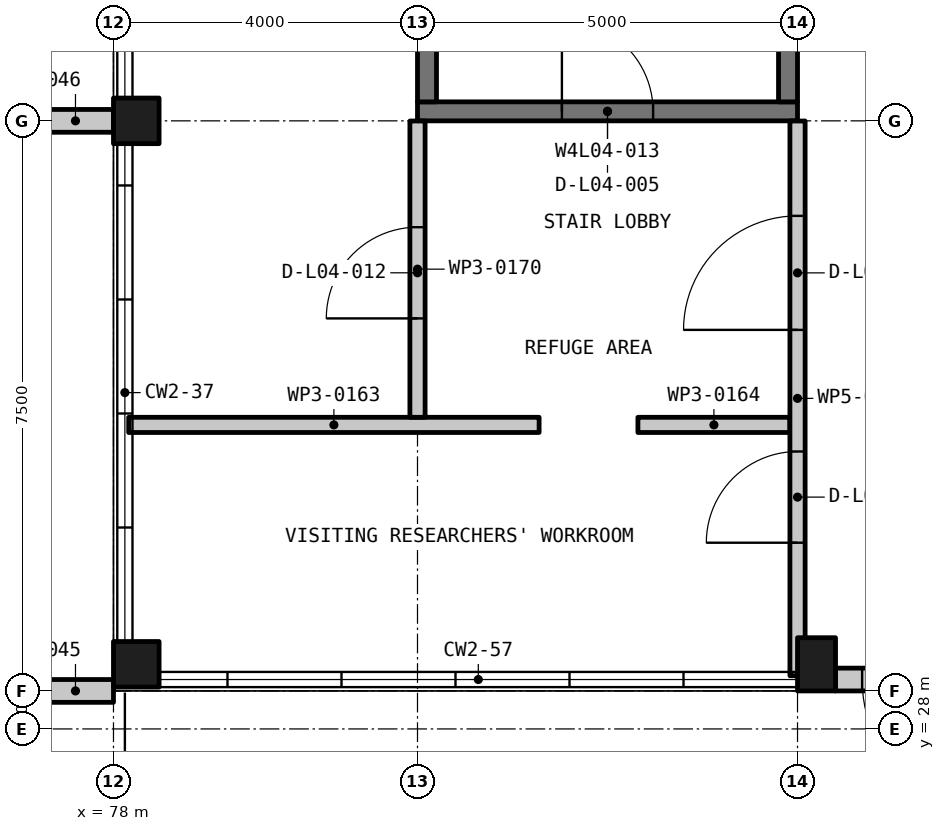
"""IFC4 building model, lengths in metres.
Left out: names, types, materials, properties, quantities, classifications, styles, units other than length and angle.
Written with IfcOpenShell. Run it as: python <this file> out.ifc"""

import sys

from ifc_helpers import new_model, si_unit, direction, frame, frame_2d, origin, origin_2d, place, context, subcontext, project, spatial, rectangle, extrude, element, fill, save


model = new_model("IFC4")
c1 = context("Model", 3, precision=1e-05, world=origin(), true_north=direction((0.0, 1.0)))
c2 = subcontext(c1, "Body", "Model", "MODEL_VIEW")
j1 = project(units=[si_unit("LENGTHUNIT", "METRE"), si_unit("PLANEANGLEUNIT", "RADIAN")], contexts=[c1])
p1 = place(None, origin())
s1 = spatial("IfcSite", under=j1, at=p1, CompositionType="ELEMENT")
p2 = place(p1, origin())
s2 = spatial("IfcBuilding", under=s1, at=p2, CompositionType="ELEMENT")
p3 = place(p2, frame((0.0, 0.0, 20.25)))
s3 = spatial("IfcBuildingStorey", under=s2, at=p3, CompositionType="ELEMENT", Elevation=20.25)
for number, where, z_axis, x_axis in (
    (1, (78.3, 28.85, -0.3), (0.0, 0.0, 1.0), (1.0, 0.0, 0.0)),
    (2, (78.3, 36.0, -0.3), (0.0, 0.0, 1.0), (1.0, 0.0, 0.0)),
):
    element("IfcColumn", number, at=place(p3, frame(where, z_axis=z_axis, x_axis=x_axis)), inside=s3, PredefinedType="COLUMN", context=c2, shape_type="SweptSolid", body=[
        extrude(rectangle(XDim=0.6, YDim=0.6, at=origin_2d()), origin(), (0.0, 0.0, 1.0), 4.5),
    ])
p4 = place(p3, frame((87.25, 28.85, -0.3), z_axis=(0.0, 0.0, 1.0), x_axis=(1.0, 0.0, 0.0)))
e3 = element("IfcColumn", 3, at=p4, inside=s3, PredefinedType="COLUMN", context=c2, shape_type="SweptSolid", body=[
    extrude(rectangle(XDim=0.5, YDim=0.7, at=origin_2d()), origin(), (0.0, 0.0, 1.0), 4.5),
])
p5 = place(p3, frame((82.0, 36.125, -0.3), z_axis=(0.0, 0.0, 1.0), x_axis=(1.0, 0.0, 0.0)))
e4 = element("IfcWall", 4, at=p5, inside=s3, PredefinedType="SHEAR", context=c2, shape_type="SweptSolid", body=[
    extrude(rectangle(XDim=5.0, YDim=0.25, at=frame_2d((2.5, 0.0))), origin(), (0.0, 0.0, 1.0), 4.5),
])
p6 = place(p5, frame((1.9, 0.0, 0.3)))
e5 = element("IfcOpeningElement", 5, at=p6, cuts=e4, PredefinedType="OPENING", context=c2, shape_type="SweptSolid", body=[
    extrude(rectangle(XDim=1.2, YDim=2.2, at=frame_2d((0.6, 1.1))), frame((0.0, 0.135, 0.0), z_axis=(0.0, -1.0, 0.0), x_axis=(1.0, 0.0, 0.0)), (0.0, 0.0, 1.0), 0.27),
])
for number, where, z_axis, x_axis in (
    (6, (86.875, 36.25, -0.3), (0.0, 0.0, 1.0), (0.0, 1.0, 0.0)),
    (7, (82.125, 36.25, -0.3), (0.0, 0.0, 1.0), (0.0, 1.0, 0.0)),
):
    element("IfcWall", number, at=place(p3, frame(where, z_axis=z_axis, x_axis=x_axis)), inside=s3, PredefinedType="SHEAR", context=c2, shape_type="SweptSolid", body=[
        extrude(rectangle(XDim=7.0, YDim=0.25, at=frame_2d((3.5, 0.0))), origin(), (0.0, 0.0, 1.0), 4.5),
    ])
p7 = place(p3, frame((90.21, 28.65, 0.0), z_axis=(0.0, 0.0, 1.0), x_axis=(-1.0, 0.0, 0.0)))
e8 = element("IfcWall", 8, at=p7, inside=s3, PredefinedType="SOLIDWALL", context=c2, shape_type="SweptSolid", body=[
    extrude(rectangle(XDim=2.71, YDim=0.3, at=frame_2d((1.355, 0.0))), origin(), (0.0, 0.0, 1.0), 3.3),
])
p8 = place(p7, frame((0.56, 0.0, 0.0)))
e9 = element("IfcOpeningElement", 9, at=p8, cuts=e8, PredefinedType="OPENING", context=c2, shape_type="SweptSolid", body=[
    extrude(rectangle(XDim=1.8, YDim=2.2, at=frame_2d((0.9, 1.1))), frame((0.0, 0.16, 0.0), z_axis=(0.0, -1.0, 0.0), x_axis=(1.0, 0.0, 0.0)), (0.0, 0.0, 1.0), 0.32),
])
for number, where, z_axis, x_axis in (
    (10, (77.0, 28.5, 0.0), (0.0, 0.0, 1.0), (1.0, 0.0, 0.0)),
    (11, (77.0, 36.0, 0.0), (0.0, 0.0, 1.0), (1.0, 0.0, 0.0)),
):
    element("IfcWall", number, at=place(p3, frame(where, z_axis=z_axis, x_axis=x_axis)), inside=s3, PredefinedType="SOLIDWALL", context=c2, shape_type="SweptSolid", body=[
        extrude(rectangle(XDim=1.0, YDim=0.3, at=frame_2d((0.5, 0.0))), origin(), (0.0, 0.0, 1.0), 4.5),
    ])
p9 = place(p3, frame((78.2, 32.0, 0.0), z_axis=(0.0, 0.0, 1.0), x_axis=(1.0, 0.0, 0.0)))
e12 = element("IfcWall", 12, at=p9, inside=s3, PredefinedType="PARTITIONING", context=c2, shape_type="SweptSolid", body=[
    extrude(rectangle(XDim=5.4, YDim=0.2, at=frame_2d((2.7, 0.0))), origin(), (0.0, 0.0, 1.0), 3.4),
])
p10 = place(p3, frame((84.9, 32.0, 0.0), z_axis=(0.0, 0.0, 1.0), x_axis=(1.0, 0.0, 0.0)))
e13 = element("IfcWall", 13, at=p10, inside=s3, PredefinedType="PARTITIONING", context=c2, shape_type="SweptSolid", body=[
    extrude(rectangle(XDim=2.0, YDim=0.2, at=frame_2d((1.0, 0.0))), origin(), (0.0, 0.0, 1.0), 4.2),
])
p11 = place(p3, frame((87.0, 28.7, 0.0), z_axis=(0.0, 0.0, 1.0), x_axis=(0.0, 1.0, 0.0)))
e14 = element("IfcWall", 14, at=p11, inside=s3, PredefinedType="PARTITIONING", context=c2, shape_type="SweptSolid", body=[
    extrude(rectangle(XDim=7.298, YDim=0.2, at=frame_2d((3.649, 0.0))), origin(), (0.0, 0.0, 1.0), 3.3),
])
p12 = place(p11, frame((4.55, 0.0, 0.0)))
e15 = element("IfcOpeningElement", 15, at=p12, cuts=e14, PredefinedType="OPENING", context=c2, shape_type="SweptSolid", body=[
    extrude(rectangle(XDim=1.5, YDim=2.1, at=frame_2d((0.75, 1.05))), frame((0.0, 0.11, 0.0), z_axis=(0.0, -1.0, 0.0), x_axis=(1.0, 0.0, 0.0)), (0.0, 0.0, 1.0), 0.22),
])
p13 = place(p11, frame((1.75, 0.0, 0.0)))
e16 = element("IfcOpeningElement", 16, at=p13, cuts=e14, PredefinedType="OPENING", context=c2, shape_type="SweptSolid", body=[
    extrude(rectangle(XDim=1.2, YDim=2.1, at=frame_2d((0.6, 1.05))), frame((0.0, 0.11, 0.0), z_axis=(0.0, -1.0, 0.0), x_axis=(1.0, 0.0, 0.0)), (0.0, 0.0, 1.0), 0.22),
])
p14 = place(p3, frame((82.0, 32.1, 0.0), z_axis=(0.0, 0.0, 1.0), x_axis=(0.0, 1.0, 0.0)))
e17 = element("IfcWall", 17, at=p14, inside=s3, PredefinedType="PARTITIONING", context=c2, shape_type="SweptSolid", body=[
    extrude(rectangle(XDim=3.898, YDim=0.2, at=frame_2d((1.949, 0.0))), origin(), (0.0, 0.0, 1.0), 3.4),
])
p15 = place(p14, frame((1.301, 0.0, 0.0)))
e18 = element("IfcOpeningElement", 18, at=p15, cuts=e17, PredefinedType="OPENING", context=c2, shape_type="SweptSolid", body=[
    extrude(rectangle(XDim=1.2, YDim=2.1, at=frame_2d((0.6, 1.05))), frame((0.0, 0.11, 0.0), z_axis=(0.0, -1.0, 0.0), x_axis=(1.0, 0.0, 0.0)), (0.0, 0.0, 1.0), 0.22),
])
p16 = place(p8, origin())
e19 = element("IfcDoor", 19, at=p16, inside=s3, OperationType="SINGLE_SWING_LEFT", PredefinedType="DOOR", context=c2, shape_type="SweptSolid", body=[
    extrude(rectangle(XDim=1.8, YDim=2.2, at=frame_2d((0.9, 1.1))), frame((0.0, 0.025, 0.0), z_axis=(0.0, -1.0, 0.0), x_axis=(1.0, 0.0, 0.0)), (0.0, 0.0, 1.0), 0.05),
])
fill(e9, e19)
p17 = place(p6, origin())
e20 = element("IfcDoor", 20, at=p17, inside=s3, OperationType="SINGLE_SWING_LEFT", PredefinedType="DOOR", context=c2, shape_type="SweptSolid", body=[
    extrude(rectangle(XDim=1.2, YDim=2.2, at=frame_2d((0.6, 1.1))), frame((0.0, 0.025, 0.0), z_axis=(0.0, -1.0, 0.0), x_axis=(1.0, 0.0, 0.0)), (0.0, 0.0, 1.0), 0.05),
])
fill(e5, e20)
p18 = place(p12, origin())
e21 = element("IfcDoor", 21, at=p18, inside=s3, OperationType="DOUBLE_DOOR_SINGLE_SWING", PredefinedType="DOOR", context=c2, shape_type="SweptSolid", body=[
    extrude(rectangle(XDim=1.5, YDim=2.1, at=frame_2d((0.75, 1.05))), frame((0.0, 0.025, 0.0), z_axis=(0.0, -1.0, 0.0), x_axis=(1.0, 0.0, 0.0)), (0.0, 0.0, 1.0), 0.05),
])
fill(e15, e21)
p19 = place(p13, origin())
e22 = element("IfcDoor", 22, at=p19, inside=s3, OperationType="SINGLE_SWING_RIGHT", PredefinedType="DOOR", context=c2, shape_type="SweptSolid", body=[
    extrude(rectangle(XDim=1.2, YDim=2.1, at=frame_2d((0.6, 1.05))), frame((0.0, 0.025, 0.0), z_axis=(0.0, -1.0, 0.0), x_axis=(1.0, 0.0, 0.0)), (0.0, 0.0, 1.0), 0.05),
])
fill(e16, e22)
p20 = place(p15, origin())
e23 = element("IfcDoor", 23, at=p20, inside=s3, OperationType="SINGLE_SWING_RIGHT", PredefinedType="DOOR", context=c2, shape_type="SweptSolid", body=[
    extrude(rectangle(XDim=1.2, YDim=2.1, at=frame_2d((0.6, 1.05))), frame((0.0, 0.025, 0.0), z_axis=(0.0, -1.0, 0.0), x_axis=(1.0, 0.0, 0.0)), (0.0, 0.0, 1.0), 0.05),
])
fill(e18, e23)
save(model, sys.argv[1])
